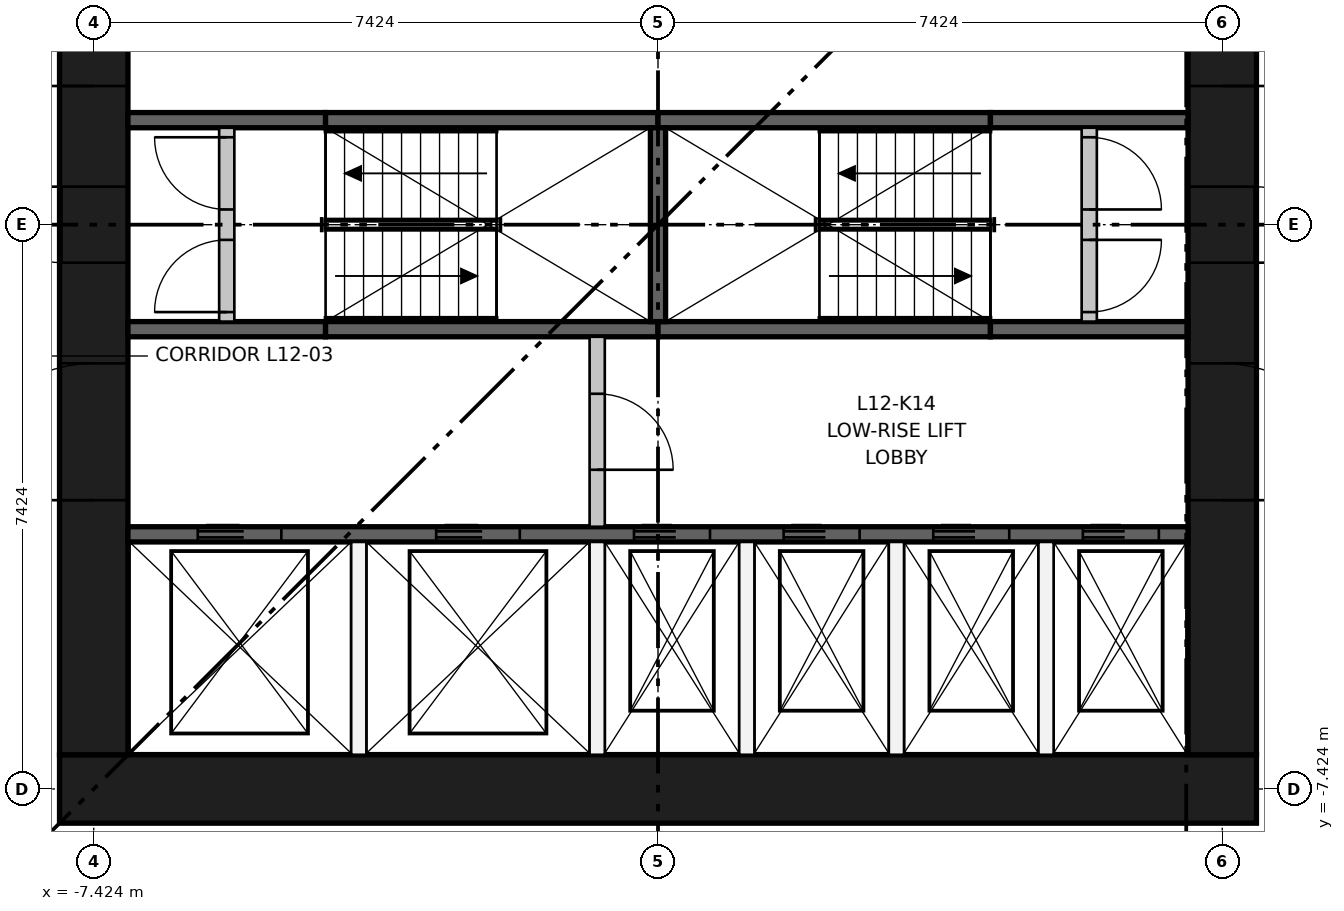
"""IFC4 building model, lengths in metres.
Left out: names, types, materials, properties, quantities, classifications, styles, units other than length and angle.
Written with IfcOpenShell. Run it as: python <this file> out.ifc"""

import sys

from ifc_helpers import new_model, si_unit, direction, frame, frame_2d, origin, place, context, subcontext, project, spatial, rectangle, extrude, element, fill, save


model = new_model("IFC4")
c1 = context("Model", 3, precision=1e-05, world=origin(), true_north=direction((0.0, 1.0)))
c2 = subcontext(c1, "Body", "Model", "MODEL_VIEW")
j1 = project(units=[si_unit("LENGTHUNIT", "METRE"), si_unit("PLANEANGLEUNIT", "RADIAN")], contexts=[c1])
p1 = place(None, origin())
s1 = spatial("IfcSite", under=j1, at=p1, CompositionType="ELEMENT")
p2 = place(p1, origin())
s2 = spatial("IfcBuilding", under=s1, at=p2, CompositionType="ELEMENT")
p3 = place(p2, frame((0.0, 0.0, 48.1)))
s3 = spatial("IfcBuildingStorey", under=s2, at=p3, CompositionType="ELEMENT", Elevation=48.1)
p4 = place(p3, frame((-7.874, -7.424, 0.0), z_axis=(0.0, 0.0, 1.0), x_axis=(1.0, 0.0, 0.0)))
e1 = element("IfcWall", 1, at=p4, inside=s3, PredefinedType="SHEAR", context=c2, shape_type="SweptSolid", body=[
    extrude(rectangle(XDim=15.748, YDim=0.9, at=frame_2d((7.874, 0.0))), origin(), (0.0, 0.0, 1.0), 3.65),
])
p5 = place(p3, frame((-7.424, -6.974, 0.0), z_axis=(0.0, 0.0, 1.0), x_axis=(0.0, 1.0, 0.0)))
e2 = element("IfcWall", 2, at=p5, inside=s3, PredefinedType="SHEAR", context=c2, shape_type="SweptSolid", body=[
    extrude(rectangle(XDim=13.948, YDim=0.9, at=frame_2d((6.974, 0.0))), origin(), (0.0, 0.0, 1.0), 3.65),
])
p6 = place(p5, frame((6.474, 0.0, 0.0)))
e3 = element("IfcOpeningElement", 3, at=p6, cuts=e2, PredefinedType="OPENING", context=c2, shape_type="SweptSolid", body=[
    extrude(rectangle(XDim=1.0, YDim=2.1, at=frame_2d((0.5, 1.05))), frame((0.0, 0.46, 0.0), z_axis=(0.0, -1.0, 0.0), x_axis=(1.0, 0.0, 0.0)), (0.0, 0.0, 1.0), 0.92),
])
p7 = place(p5, frame((3.35, 0.0, 0.0)))
e4 = element("IfcOpeningElement", 4, at=p7, cuts=e2, PredefinedType="OPENING", context=c2, shape_type="SweptSolid", body=[
    extrude(rectangle(XDim=1.8, YDim=2.1, at=frame_2d((0.9, 1.05))), frame((0.0, 0.46, 0.0), z_axis=(0.0, -1.0, 0.0), x_axis=(1.0, 0.0, 0.0)), (0.0, 0.0, 1.0), 0.92),
])
p8 = place(p5, frame((8.799, 0.0, 0.0)))
e5 = element("IfcOpeningElement", 5, at=p8, cuts=e2, PredefinedType="OPENING", context=c2, shape_type="SweptSolid", body=[
    extrude(rectangle(XDim=1.8, YDim=2.1, at=frame_2d((0.9, 1.05))), frame((0.0, 0.46, 0.0), z_axis=(0.0, -1.0, 0.0), x_axis=(1.0, 0.0, 0.0)), (0.0, 0.0, 1.0), 0.92),
])
p9 = place(p5, frame((11.974, 0.0, 0.0)))
e6 = element("IfcOpeningElement", 6, at=p9, cuts=e2, PredefinedType="OPENING", context=c2, shape_type="SweptSolid", body=[
    extrude(rectangle(XDim=1.0, YDim=2.1, at=frame_2d((0.5, 1.05))), frame((0.0, 0.46, 0.0), z_axis=(0.0, -1.0, 0.0), x_axis=(1.0, 0.0, 0.0)), (0.0, 0.0, 1.0), 0.92),
])
p10 = place(p3, frame((7.424, -6.974, 0.0), z_axis=(0.0, 0.0, 1.0), x_axis=(0.0, 1.0, 0.0)))
e7 = element("IfcWall", 7, at=p10, inside=s3, PredefinedType="SHEAR", context=c2, shape_type="SweptSolid", body=[
    extrude(rectangle(XDim=13.948, YDim=0.9, at=frame_2d((6.974, 0.0))), origin(), (0.0, 0.0, 1.0), 3.65),
])
p11 = place(p10, frame((6.474, 0.0, 0.0)))
e8 = element("IfcOpeningElement", 8, at=p11, cuts=e7, PredefinedType="OPENING", context=c2, shape_type="SweptSolid", body=[
    extrude(rectangle(XDim=1.0, YDim=2.1, at=frame_2d((0.5, 1.05))), frame((0.0, 0.46, 0.0), z_axis=(0.0, -1.0, 0.0), x_axis=(1.0, 0.0, 0.0)), (0.0, 0.0, 1.0), 0.92),
])
p12 = place(p10, frame((3.35, 0.0, 0.0)))
e9 = element("IfcOpeningElement", 9, at=p12, cuts=e7, PredefinedType="OPENING", context=c2, shape_type="SweptSolid", body=[
    extrude(rectangle(XDim=1.8, YDim=2.1, at=frame_2d((0.9, 1.05))), frame((0.0, 0.46, 0.0), z_axis=(0.0, -1.0, 0.0), x_axis=(1.0, 0.0, 0.0)), (0.0, 0.0, 1.0), 0.92),
])
p13 = place(p10, frame((8.799, 0.0, 0.0)))
e10 = element("IfcOpeningElement", 10, at=p13, cuts=e7, PredefinedType="OPENING", context=c2, shape_type="SweptSolid", body=[
    extrude(rectangle(XDim=1.8, YDim=2.1, at=frame_2d((0.9, 1.05))), frame((0.0, 0.46, 0.0), z_axis=(0.0, -1.0, 0.0), x_axis=(1.0, 0.0, 0.0)), (0.0, 0.0, 1.0), 0.92),
])
p14 = place(p3, frame((-6.974, -4.074, 0.0), z_axis=(0.0, 0.0, 1.0), x_axis=(1.0, 0.0, 0.0)))
e11 = element("IfcWall", 11, at=p14, inside=s3, PredefinedType="SHEAR", context=c2, shape_type="SweptSolid", body=[
    extrude(rectangle(XDim=13.948, YDim=0.2, at=frame_2d((6.974, 0.0))), origin(), (0.0, 0.0, 1.0), 3.3),
])
p15 = place(p14, frame((0.918, 0.0, 0.0)))
e12 = element("IfcOpeningElement", 12, at=p15, cuts=e11, PredefinedType="OPENING", context=c2, shape_type="SweptSolid", body=[
    extrude(rectangle(XDim=1.1, YDim=2.1, at=frame_2d((0.55, 1.05))), frame((0.0, 0.11, 0.0), z_axis=(0.0, -1.0, 0.0), x_axis=(1.0, 0.0, 0.0)), (0.0, 0.0, 1.0), 0.22),
])
p16 = place(p14, frame((4.055, 0.0, 0.0)))
e13 = element("IfcOpeningElement", 13, at=p16, cuts=e11, PredefinedType="OPENING", context=c2, shape_type="SweptSolid", body=[
    extrude(rectangle(XDim=1.1, YDim=2.1, at=frame_2d((0.55, 1.05))), frame((0.0, 0.11, 0.0), z_axis=(0.0, -1.0, 0.0), x_axis=(1.0, 0.0, 0.0)), (0.0, 0.0, 1.0), 0.22),
])
p17 = place(p14, frame((6.658, 0.0, 0.0)))
e14 = element("IfcOpeningElement", 14, at=p17, cuts=e11, PredefinedType="OPENING", context=c2, shape_type="SweptSolid", body=[
    extrude(rectangle(XDim=1.0, YDim=2.1, at=frame_2d((0.5, 1.05))), frame((0.0, 0.11, 0.0), z_axis=(0.0, -1.0, 0.0), x_axis=(1.0, 0.0, 0.0)), (0.0, 0.0, 1.0), 0.22),
])
p18 = place(p14, frame((8.627, 0.0, 0.0)))
e15 = element("IfcOpeningElement", 15, at=p18, cuts=e11, PredefinedType="OPENING", context=c2, shape_type="SweptSolid", body=[
    extrude(rectangle(XDim=1.0, YDim=2.1, at=frame_2d((0.5, 1.05))), frame((0.0, 0.11, 0.0), z_axis=(0.0, -1.0, 0.0), x_axis=(1.0, 0.0, 0.0)), (0.0, 0.0, 1.0), 0.22),
])
p19 = place(p14, frame((10.595, 0.0, 0.0)))
e16 = element("IfcOpeningElement", 16, at=p19, cuts=e11, PredefinedType="OPENING", context=c2, shape_type="SweptSolid", body=[
    extrude(rectangle(XDim=1.0, YDim=2.1, at=frame_2d((0.5, 1.05))), frame((0.0, 0.11, 0.0), z_axis=(0.0, -1.0, 0.0), x_axis=(1.0, 0.0, 0.0)), (0.0, 0.0, 1.0), 0.22),
])
p20 = place(p14, frame((12.564, 0.0, 0.0)))
e17 = element("IfcOpeningElement", 17, at=p20, cuts=e11, PredefinedType="OPENING", context=c2, shape_type="SweptSolid", body=[
    extrude(rectangle(XDim=1.0, YDim=2.1, at=frame_2d((0.5, 1.05))), frame((0.0, 0.11, 0.0), z_axis=(0.0, -1.0, 0.0), x_axis=(1.0, 0.0, 0.0)), (0.0, 0.0, 1.0), 0.22),
])
p21 = place(p3, frame((-6.974, -1.375, 0.0), z_axis=(0.0, 0.0, 1.0), x_axis=(1.0, 0.0, 0.0)))
e18 = element("IfcWall", 18, at=p21, inside=s3, PredefinedType="SHEAR", context=c2, shape_type="SweptSolid", body=[
    extrude(rectangle(XDim=2.6, YDim=0.2, at=frame_2d((1.3, 0.0))), origin(), (0.0, 0.0, 1.0), 3.3),
])
for number, where, z_axis, x_axis in (
    (19, (-4.374, -1.375, 0.0), (0.0, 0.0, 1.0), (1.0, 0.0, 0.0)),
    (20, (0.0, -1.375, 0.0), (0.0, 0.0, 1.0), (1.0, 0.0, 0.0)),
):
    element("IfcWall", number, at=place(p3, frame(where, z_axis=z_axis, x_axis=x_axis)), inside=s3, PredefinedType="SHEAR", context=c2, shape_type="SweptSolid", body=[
        extrude(rectangle(XDim=4.374, YDim=0.2, at=frame_2d((2.187, 0.0))), origin(), (0.0, 0.0, 1.0), 3.3),
    ])
for number, where, z_axis, x_axis in (
    (21, (4.374, -1.375, 0.0), (0.0, 0.0, 1.0), (1.0, 0.0, 0.0)),
    (22, (-6.974, 1.375, 0.0), (0.0, 0.0, 1.0), (1.0, 0.0, 0.0)),
):
    element("IfcWall", number, at=place(p3, frame(where, z_axis=z_axis, x_axis=x_axis)), inside=s3, PredefinedType="SHEAR", context=c2, shape_type="SweptSolid", body=[
        extrude(rectangle(XDim=2.6, YDim=0.2, at=frame_2d((1.3, 0.0))), origin(), (0.0, 0.0, 1.0), 3.3),
    ])
for number, where, z_axis, x_axis in (
    (23, (-4.374, 1.375, 0.0), (0.0, 0.0, 1.0), (1.0, 0.0, 0.0)),
    (24, (0.0, 1.375, 0.0), (0.0, 0.0, 1.0), (1.0, 0.0, 0.0)),
):
    element("IfcWall", number, at=place(p3, frame(where, z_axis=z_axis, x_axis=x_axis)), inside=s3, PredefinedType="SHEAR", context=c2, shape_type="SweptSolid", body=[
        extrude(rectangle(XDim=4.374, YDim=0.2, at=frame_2d((2.187, 0.0))), origin(), (0.0, 0.0, 1.0), 3.3),
    ])
p22 = place(p3, frame((4.374, 1.375, 0.0), z_axis=(0.0, 0.0, 1.0), x_axis=(1.0, 0.0, 0.0)))
e25 = element("IfcWall", 25, at=p22, inside=s3, PredefinedType="SHEAR", context=c2, shape_type="SweptSolid", body=[
    extrude(rectangle(XDim=2.6, YDim=0.2, at=frame_2d((1.3, 0.0))), origin(), (0.0, 0.0, 1.0), 3.3),
])
p23 = place(p3, frame((0.0, -1.275, 0.0), z_axis=(0.0, 0.0, 1.0), x_axis=(0.0, 1.0, 0.0)))
e26 = element("IfcWall", 26, at=p23, inside=s3, PredefinedType="SHEAR", context=c2, shape_type="SweptSolid", body=[
    extrude(rectangle(XDim=2.55, YDim=0.2, at=frame_2d((1.275, 0.0))), origin(), (0.0, 0.0, 1.0), 3.3),
])
for number, where, z_axis, x_axis in (
    (27, (-3.937, -6.974, 0.0), (0.0, 0.0, 1.0), (0.0, 1.0, 0.0)),
    (28, (-0.8, -6.974, 0.0), (0.0, 0.0, 1.0), (0.0, 1.0, 0.0)),
):
    element("IfcWall", number, at=place(p3, frame(where, z_axis=z_axis, x_axis=x_axis)), inside=s3, PredefinedType="PARTITIONING", context=c2, shape_type="SweptSolid", body=[
        extrude(rectangle(XDim=2.8, YDim=0.2, at=frame_2d((1.4, 0.0))), origin(), (0.0, 0.0, 1.0), 3.3),
    ])
p24 = place(p3, frame((-0.8, -3.974, 0.0), z_axis=(0.0, 0.0, 1.0), x_axis=(0.0, 1.0, 0.0)))
e29 = element("IfcWall", 29, at=p24, inside=s3, PredefinedType="PARTITIONING", context=c2, shape_type="SweptSolid", body=[
    extrude(rectangle(XDim=2.499, YDim=0.2, at=frame_2d((1.25, 0.0))), origin(), (0.0, 0.0, 1.0), 3.3),
])
p25 = place(p24, frame((0.75, 0.0, 0.0)))
e30 = element("IfcOpeningElement", 30, at=p25, cuts=e29, PredefinedType="OPENING", context=c2, shape_type="SweptSolid", body=[
    extrude(rectangle(XDim=1.0, YDim=2.1, at=frame_2d((0.5, 1.05))), frame((0.0, 0.11, 0.0), z_axis=(0.0, -1.0, 0.0), x_axis=(1.0, 0.0, 0.0)), (0.0, 0.0, 1.0), 0.22),
])
for number, where, z_axis, x_axis in (
    (31, (1.168, -6.974, 0.0), (0.0, 0.0, 1.0), (0.0, 1.0, 0.0)),
    (32, (3.137, -6.974, 0.0), (0.0, 0.0, 1.0), (0.0, 1.0, 0.0)),
    (33, (5.105, -6.974, 0.0), (0.0, 0.0, 1.0), (0.0, 1.0, 0.0)),
):
    element("IfcWall", number, at=place(p3, frame(where, z_axis=z_axis, x_axis=x_axis)), inside=s3, PredefinedType="PARTITIONING", context=c2, shape_type="SweptSolid", body=[
        extrude(rectangle(XDim=2.8, YDim=0.2, at=frame_2d((1.4, 0.0))), origin(), (0.0, 0.0, 1.0), 3.3),
    ])
p26 = place(p3, frame((-5.674, -1.275, 0.0), z_axis=(0.0, 0.0, 1.0), x_axis=(0.0, 1.0, 0.0)))
e34 = element("IfcWall", 34, at=p26, inside=s3, PredefinedType="PARTITIONING", context=c2, shape_type="SweptSolid", body=[
    extrude(rectangle(XDim=2.55, YDim=0.2, at=frame_2d((1.275, 0.0))), origin(), (0.0, 0.0, 1.0), 3.3),
])
p27 = place(p26, frame((0.125, 0.0, 0.0)))
e35 = element("IfcOpeningElement", 35, at=p27, cuts=e34, PredefinedType="OPENING", context=c2, shape_type="SweptSolid", body=[
    extrude(rectangle(XDim=0.95, YDim=2.1, at=frame_2d((0.475, 1.05))), frame((0.0, 0.11, 0.0), z_axis=(0.0, -1.0, 0.0), x_axis=(1.0, 0.0, 0.0)), (0.0, 0.0, 1.0), 0.22),
])
p28 = place(p26, frame((1.475, 0.0, 0.0)))
e36 = element("IfcOpeningElement", 36, at=p28, cuts=e34, PredefinedType="OPENING", context=c2, shape_type="SweptSolid", body=[
    extrude(rectangle(XDim=0.95, YDim=2.1, at=frame_2d((0.475, 1.05))), frame((0.0, 0.11, 0.0), z_axis=(0.0, -1.0, 0.0), x_axis=(1.0, 0.0, 0.0)), (0.0, 0.0, 1.0), 0.22),
])
p29 = place(p3, frame((5.674, -1.275, 0.0), z_axis=(0.0, 0.0, 1.0), x_axis=(0.0, 1.0, 0.0)))
e37 = element("IfcWall", 37, at=p29, inside=s3, PredefinedType="PARTITIONING", context=c2, shape_type="SweptSolid", body=[
    extrude(rectangle(XDim=2.55, YDim=0.2, at=frame_2d((1.275, 0.0))), origin(), (0.0, 0.0, 1.0), 3.3),
])
p30 = place(p29, frame((0.125, 0.0, 0.0)))
e38 = element("IfcOpeningElement", 38, at=p30, cuts=e37, PredefinedType="OPENING", context=c2, shape_type="SweptSolid", body=[
    extrude(rectangle(XDim=0.95, YDim=2.1, at=frame_2d((0.475, 1.05))), frame((0.0, 0.11, 0.0), z_axis=(0.0, -1.0, 0.0), x_axis=(1.0, 0.0, 0.0)), (0.0, 0.0, 1.0), 0.22),
])
p31 = place(p29, frame((1.475, 0.0, 0.0)))
e39 = element("IfcOpeningElement", 39, at=p31, cuts=e37, PredefinedType="OPENING", context=c2, shape_type="SweptSolid", body=[
    extrude(rectangle(XDim=0.95, YDim=2.1, at=frame_2d((0.475, 1.05))), frame((0.0, 0.11, 0.0), z_axis=(0.0, -1.0, 0.0), x_axis=(1.0, 0.0, 0.0)), (0.0, 0.0, 1.0), 0.22),
])
p32 = place(p15, origin())
e40 = element("IfcDoor", 40, at=p32, inside=s3, OperationType="DOUBLE_DOOR_SLIDING", PredefinedType="DOOR", context=c2, shape_type="SweptSolid", body=[
    extrude(rectangle(XDim=1.1, YDim=2.1, at=frame_2d((0.55, 1.05))), frame((0.0, 0.025, 0.0), z_axis=(0.0, -1.0, 0.0), x_axis=(1.0, 0.0, 0.0)), (0.0, 0.0, 1.0), 0.05),
])
fill(e12, e40)
p33 = place(p16, origin())
e41 = element("IfcDoor", 41, at=p33, inside=s3, OperationType="DOUBLE_DOOR_SLIDING", PredefinedType="DOOR", context=c2, shape_type="SweptSolid", body=[
    extrude(rectangle(XDim=1.1, YDim=2.1, at=frame_2d((0.55, 1.05))), frame((0.0, 0.025, 0.0), z_axis=(0.0, -1.0, 0.0), x_axis=(1.0, 0.0, 0.0)), (0.0, 0.0, 1.0), 0.05),
])
fill(e13, e41)
p34 = place(p17, origin())
e42 = element("IfcDoor", 42, at=p34, inside=s3, OperationType="DOUBLE_DOOR_SLIDING", PredefinedType="DOOR", context=c2, shape_type="SweptSolid", body=[
    extrude(rectangle(XDim=1.0, YDim=2.1, at=frame_2d((0.5, 1.05))), frame((0.0, 0.025, 0.0), z_axis=(0.0, -1.0, 0.0), x_axis=(1.0, 0.0, 0.0)), (0.0, 0.0, 1.0), 0.05),
])
fill(e14, e42)
p35 = place(p18, origin())
e43 = element("IfcDoor", 43, at=p35, inside=s3, OperationType="DOUBLE_DOOR_SLIDING", PredefinedType="DOOR", context=c2, shape_type="SweptSolid", body=[
    extrude(rectangle(XDim=1.0, YDim=2.1, at=frame_2d((0.5, 1.05))), frame((0.0, 0.025, 0.0), z_axis=(0.0, -1.0, 0.0), x_axis=(1.0, 0.0, 0.0)), (0.0, 0.0, 1.0), 0.05),
])
fill(e15, e43)
p36 = place(p19, origin())
e44 = element("IfcDoor", 44, at=p36, inside=s3, OperationType="DOUBLE_DOOR_SLIDING", PredefinedType="DOOR", context=c2, shape_type="SweptSolid", body=[
    extrude(rectangle(XDim=1.0, YDim=2.1, at=frame_2d((0.5, 1.05))), frame((0.0, 0.025, 0.0), z_axis=(0.0, -1.0, 0.0), x_axis=(1.0, 0.0, 0.0)), (0.0, 0.0, 1.0), 0.05),
])
fill(e16, e44)
p37 = place(p20, origin())
e45 = element("IfcDoor", 45, at=p37, inside=s3, OperationType="DOUBLE_DOOR_SLIDING", PredefinedType="DOOR", context=c2, shape_type="SweptSolid", body=[
    extrude(rectangle(XDim=1.0, YDim=2.1, at=frame_2d((0.5, 1.05))), frame((0.0, 0.025, 0.0), z_axis=(0.0, -1.0, 0.0), x_axis=(1.0, 0.0, 0.0)), (0.0, 0.0, 1.0), 0.05),
])
fill(e17, e45)
p38 = place(p27, origin())
e46 = element("IfcDoor", 46, at=p38, inside=s3, OperationType="SINGLE_SWING_LEFT", PredefinedType="DOOR", context=c2, shape_type="SweptSolid", body=[
    extrude(rectangle(XDim=0.95, YDim=2.1, at=frame_2d((0.475, 1.05))), frame((0.0, 0.025, 0.0), z_axis=(0.0, -1.0, 0.0), x_axis=(1.0, 0.0, 0.0)), (0.0, 0.0, 1.0), 0.05),
])
fill(e35, e46)
p39 = place(p28, origin())
e47 = element("IfcDoor", 47, at=p39, inside=s3, OperationType="SINGLE_SWING_RIGHT", PredefinedType="DOOR", context=c2, shape_type="SweptSolid", body=[
    extrude(rectangle(XDim=0.95, YDim=2.1, at=frame_2d((0.475, 1.05))), frame((0.0, 0.025, 0.0), z_axis=(0.0, -1.0, 0.0), x_axis=(1.0, 0.0, 0.0)), (0.0, 0.0, 1.0), 0.05),
])
fill(e36, e47)
p40 = place(p30, frame((0.95, 0.0, 0.0), z_axis=(0.0, 0.0, 1.0), x_axis=(-1.0, 0.0, 0.0)))
e48 = element("IfcDoor", 48, at=p40, inside=s3, OperationType="SINGLE_SWING_RIGHT", PredefinedType="DOOR", context=c2, shape_type="SweptSolid", body=[
    extrude(rectangle(XDim=0.95, YDim=2.1, at=frame_2d((0.475, 1.05))), frame((0.0, 0.025, 0.0), z_axis=(0.0, -1.0, 0.0), x_axis=(1.0, 0.0, 0.0)), (0.0, 0.0, 1.0), 0.05),
])
fill(e38, e48)
p41 = place(p31, frame((0.95, 0.0, 0.0), z_axis=(0.0, 0.0, 1.0), x_axis=(-1.0, 0.0, 0.0)))
e49 = element("IfcDoor", 49, at=p41, inside=s3, OperationType="SINGLE_SWING_LEFT", PredefinedType="DOOR", context=c2, shape_type="SweptSolid", body=[
    extrude(rectangle(XDim=0.95, YDim=2.1, at=frame_2d((0.475, 1.05))), frame((0.0, 0.025, 0.0), z_axis=(0.0, -1.0, 0.0), x_axis=(1.0, 0.0, 0.0)), (0.0, 0.0, 1.0), 0.05),
])
fill(e39, e49)
p42 = place(p25, frame((1.0, 0.0, 0.0), z_axis=(0.0, 0.0, 1.0), x_axis=(-1.0, 0.0, 0.0)))
e50 = element("IfcDoor", 50, at=p42, inside=s3, OperationType="SINGLE_SWING_LEFT", PredefinedType="DOOR", context=c2, shape_type="SweptSolid", body=[
    extrude(rectangle(XDim=1.0, YDim=2.1, at=frame_2d((0.5, 1.05))), frame((0.0, 0.025, 0.0), z_axis=(0.0, -1.0, 0.0), x_axis=(1.0, 0.0, 0.0)), (0.0, 0.0, 1.0), 0.05),
])
fill(e30, e50)
p43 = place(p6, origin())
e51 = element("IfcDoor", 51, at=p43, inside=s3, OperationType="SINGLE_SWING_RIGHT", PredefinedType="DOOR", context=c2, shape_type="SweptSolid", body=[
    extrude(rectangle(XDim=1.0, YDim=2.1, at=frame_2d((0.5, 1.05))), frame((0.0, 0.45, 0.0), z_axis=(0.0, -1.0, 0.0), x_axis=(1.0, 0.0, 0.0)), (0.0, 0.0, 1.0), 0.05),
])
fill(e3, e51)
p44 = place(p7, origin())
e52 = element("IfcDoor", 52, at=p44, inside=s3, OperationType="DOUBLE_DOOR_SINGLE_SWING", PredefinedType="DOOR", context=c2, shape_type="SweptSolid", body=[
    extrude(rectangle(XDim=1.8, YDim=2.1, at=frame_2d((0.9, 1.05))), frame((0.0, 0.025, 0.0), z_axis=(0.0, -1.0, 0.0), x_axis=(1.0, 0.0, 0.0)), (0.0, 0.0, 1.0), 0.05),
])
fill(e4, e52)
p45 = place(p8, origin())
e53 = element("IfcDoor", 53, at=p45, inside=s3, OperationType="DOUBLE_DOOR_SINGLE_SWING", PredefinedType="DOOR", context=c2, shape_type="SweptSolid", body=[
    extrude(rectangle(XDim=1.8, YDim=2.1, at=frame_2d((0.9, 1.05))), frame((0.0, 0.025, 0.0), z_axis=(0.0, -1.0, 0.0), x_axis=(1.0, 0.0, 0.0)), (0.0, 0.0, 1.0), 0.05),
])
fill(e5, e53)
p46 = place(p11, frame((1.0, 0.0, 0.0), z_axis=(0.0, 0.0, 1.0), x_axis=(-1.0, 0.0, 0.0)))
e54 = element("IfcDoor", 54, at=p46, inside=s3, OperationType="SINGLE_SWING_LEFT", PredefinedType="DOOR", context=c2, shape_type="SweptSolid", body=[
    extrude(rectangle(XDim=1.0, YDim=2.1, at=frame_2d((0.5, 1.05))), frame((0.0, 0.45, 0.0), z_axis=(0.0, -1.0, 0.0), x_axis=(1.0, 0.0, 0.0)), (0.0, 0.0, 1.0), 0.05),
])
fill(e8, e54)
p47 = place(p12, frame((1.8, 0.0, 0.0), z_axis=(0.0, 0.0, 1.0), x_axis=(-1.0, 0.0, 0.0)))
e55 = element("IfcDoor", 55, at=p47, inside=s3, OperationType="DOUBLE_DOOR_SINGLE_SWING", PredefinedType="DOOR", context=c2, shape_type="SweptSolid", body=[
    extrude(rectangle(XDim=1.8, YDim=2.1, at=frame_2d((0.9, 1.05))), frame((0.0, 0.025, 0.0), z_axis=(0.0, -1.0, 0.0), x_axis=(1.0, 0.0, 0.0)), (0.0, 0.0, 1.0), 0.05),
])
fill(e9, e55)
p48 = place(p13, frame((1.8, 0.0, 0.0), z_axis=(0.0, 0.0, 1.0), x_axis=(-1.0, 0.0, 0.0)))
e56 = element("IfcDoor", 56, at=p48, inside=s3, OperationType="DOUBLE_DOOR_SINGLE_SWING", PredefinedType="DOOR", context=c2, shape_type="SweptSolid", body=[
    extrude(rectangle(XDim=1.8, YDim=2.1, at=frame_2d((0.9, 1.05))), frame((0.0, 0.025, 0.0), z_axis=(0.0, -1.0, 0.0), x_axis=(1.0, 0.0, 0.0)), (0.0, 0.0, 1.0), 0.05),
])
fill(e10, e56)
save(model, sys.argv[1])
